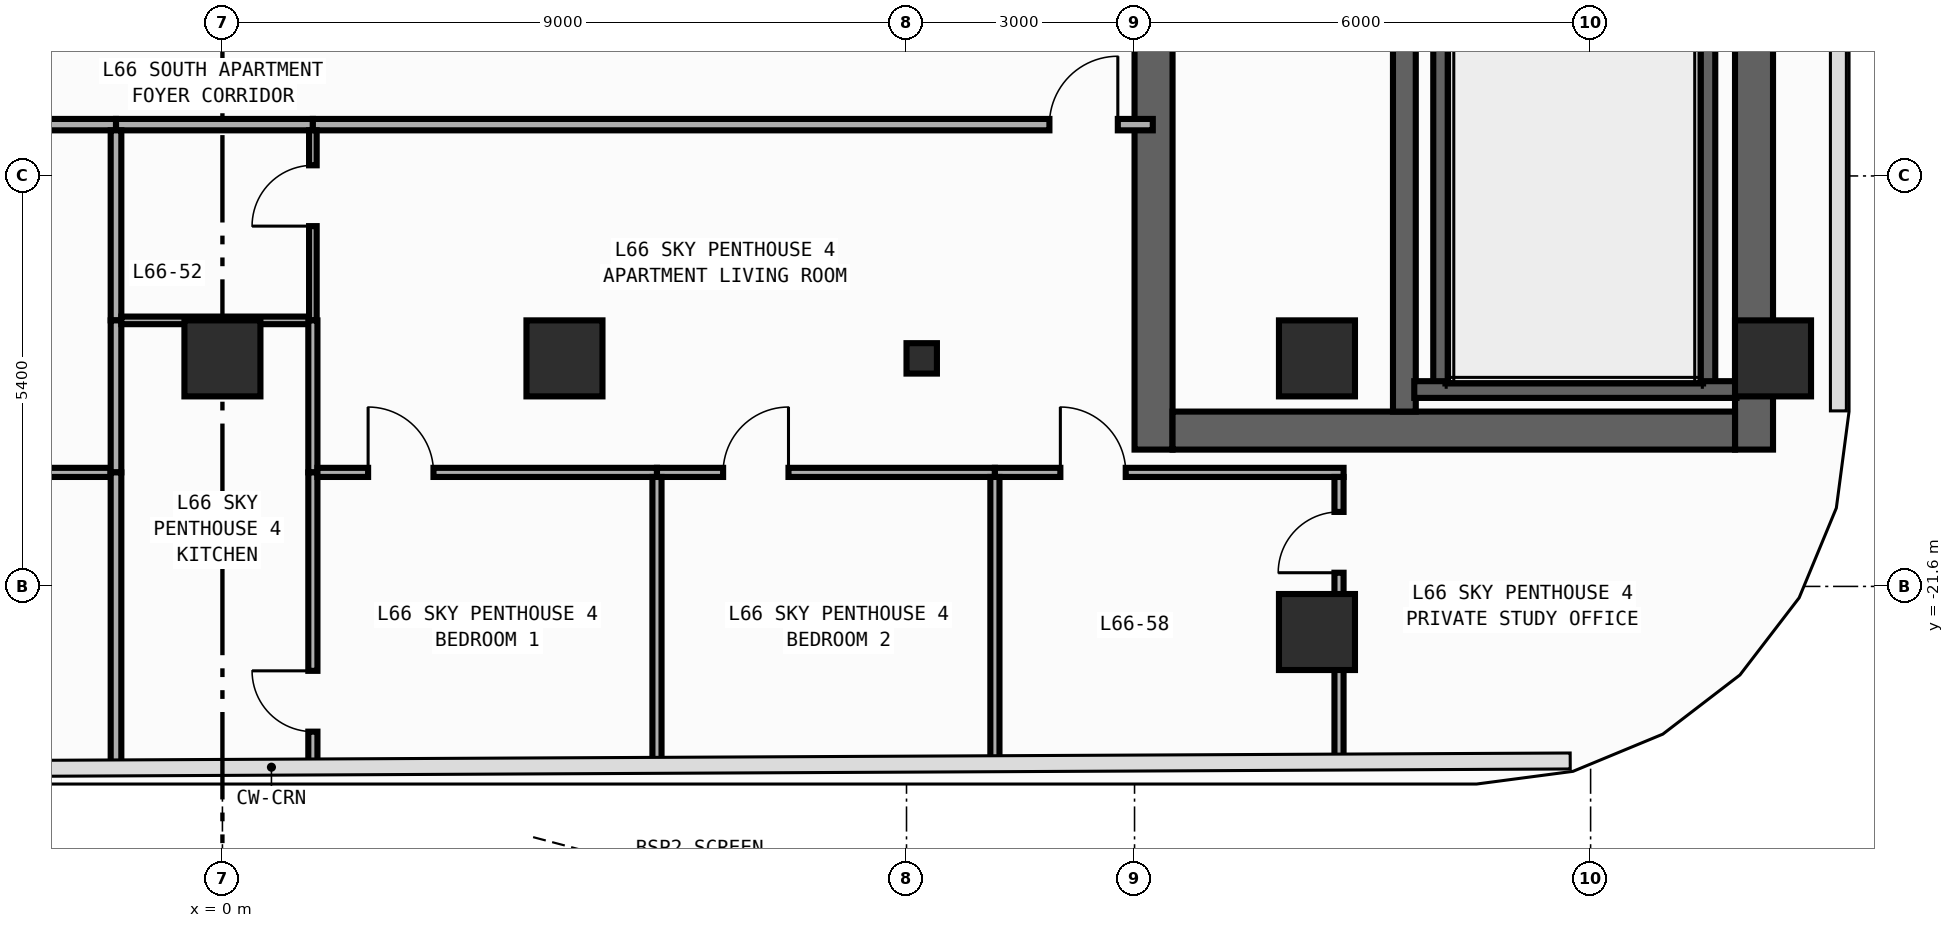
"""IFC4 building model, lengths in metres.
Left out: names, types, materials, properties, quantities, classifications, styles, units other than length and angle.
Written with IfcOpenShell. Run it as: python <this file> out.ifc"""

import sys

from ifc_helpers import new_model, si_unit, direction, frame, frame_2d, origin, origin_2d, place, context, subcontext, project, spatial, rectangle, circle, i_section, extrude, element, fill, save


model = new_model("IFC4")
c1 = context("Model", 3, precision=1e-05, world=origin(), true_north=direction((0.0, 1.0)))
c2 = subcontext(c1, "Body", "Model", "MODEL_VIEW")
j1 = project(units=[si_unit("LENGTHUNIT", "METRE"), si_unit("PLANEANGLEUNIT", "RADIAN")], contexts=[c1])
p1 = place(None, origin())
s1 = spatial("IfcSite", under=j1, at=p1, CompositionType="ELEMENT")
p2 = place(p1, origin())
s2 = spatial("IfcBuilding", under=s1, at=p2, CompositionType="ELEMENT")
p3 = place(p2, frame((0.0, 0.0, 277.6)))
s3 = spatial("IfcBuildingStorey", under=s2, at=p3, CompositionType="ELEMENT", Elevation=277.6)
p4 = place(p3, frame((12.25, -19.8, 0.0), z_axis=(0.0, 0.0, 1.0), x_axis=(0.0, 1.0, 0.0)))
e1 = element("IfcWall", 1, at=p4, inside=s3, PredefinedType="SHEAR", context=c2, shape_type="SweptSolid", body=[
    extrude(rectangle(XDim=27.0, YDim=0.5, at=frame_2d((13.5, 0.0))), origin(), (0.0, 0.0, 1.0), 3.54),
])
p5 = place(p4, frame((23.05, 0.0, 0.0)))
e2 = element("IfcOpeningElement", 2, at=p5, cuts=e1, PredefinedType="OPENING", context=c2, shape_type="SweptSolid", body=[
    extrude(rectangle(XDim=1.1, YDim=2.2, at=frame_2d((0.55, 1.1))), frame((0.0, 0.26, 0.0), z_axis=(0.0, -1.0, 0.0), x_axis=(1.0, 0.0, 0.0)), (0.0, 0.0, 1.0), 0.52),
])
p6 = place(p4, frame((19.85, 0.0, 0.0)))
e3 = element("IfcOpeningElement", 3, at=p6, cuts=e1, PredefinedType="OPENING", context=c2, shape_type="SweptSolid", body=[
    extrude(rectangle(XDim=1.1, YDim=2.2, at=frame_2d((0.55, 1.1))), frame((0.0, 0.26, 0.0), z_axis=(0.0, -1.0, 0.0), x_axis=(1.0, 0.0, 0.0)), (0.0, 0.0, 1.0), 0.52),
])
p7 = place(p4, frame((16.65, 0.0, 0.0)))
e4 = element("IfcOpeningElement", 4, at=p7, cuts=e1, PredefinedType="OPENING", context=c2, shape_type="SweptSolid", body=[
    extrude(rectangle(XDim=1.1, YDim=2.2, at=frame_2d((0.55, 1.1))), frame((0.0, 0.26, 0.0), z_axis=(0.0, -1.0, 0.0), x_axis=(1.0, 0.0, 0.0)), (0.0, 0.0, 1.0), 0.52),
])
p8 = place(p4, frame((6.275, 0.0, 0.0)))
e5 = element("IfcOpeningElement", 5, at=p8, cuts=e1, PredefinedType="OPENING", context=c2, shape_type="SweptSolid", body=[
    extrude(rectangle(XDim=0.85, YDim=2.1, at=frame_2d((0.425, 1.05))), frame((0.0, 0.26, 0.0), z_axis=(0.0, -1.0, 0.0), x_axis=(1.0, 0.0, 0.0)), (0.0, 0.0, 1.0), 0.52),
])
p9 = place(p4, frame((8.575, 0.0, 0.0)))
e6 = element("IfcOpeningElement", 6, at=p9, cuts=e1, PredefinedType="OPENING", context=c2, shape_type="SweptSolid", body=[
    extrude(rectangle(XDim=0.85, YDim=2.1, at=frame_2d((0.425, 1.05))), frame((0.0, 0.26, 0.0), z_axis=(0.0, -1.0, 0.0), x_axis=(1.0, 0.0, 0.0)), (0.0, 0.0, 1.0), 0.52),
])
p10 = place(p4, frame((10.675, 0.0, 0.0)))
e7 = element("IfcOpeningElement", 7, at=p10, cuts=e1, PredefinedType="OPENING", context=c2, shape_type="SweptSolid", body=[
    extrude(rectangle(XDim=0.85, YDim=2.1, at=frame_2d((0.425, 1.05))), frame((0.0, 0.26, 0.0), z_axis=(0.0, -1.0, 0.0), x_axis=(1.0, 0.0, 0.0)), (0.0, 0.0, 1.0), 0.52),
])
p11 = place(p4, frame((12.725, 0.0, 0.0)))
e8 = element("IfcOpeningElement", 8, at=p11, cuts=e1, PredefinedType="OPENING", context=c2, shape_type="SweptSolid", body=[
    extrude(rectangle(XDim=1.15, YDim=2.2, at=frame_2d((0.575, 1.1))), frame((0.0, 0.26, 0.0), z_axis=(0.0, -1.0, 0.0), x_axis=(1.0, 0.0, 0.0)), (0.0, 0.0, 1.0), 0.52),
])
p12 = place(p4, frame((25.125, 0.0, 0.0)))
e9 = element("IfcOpeningElement", 9, at=p12, cuts=e1, PredefinedType="OPENING", context=c2, shape_type="SweptSolid", body=[
    extrude(rectangle(XDim=0.85, YDim=2.1, at=frame_2d((0.425, 1.05))), frame((0.0, 0.26, 0.0), z_axis=(0.0, -1.0, 0.0), x_axis=(1.0, 0.0, 0.0)), (0.0, 0.0, 1.0), 0.52),
])
p13 = place(p3, frame((20.15, -19.8, 0.0), z_axis=(0.0, 0.0, 1.0), x_axis=(0.0, 1.0, 0.0)))
e10 = element("IfcWall", 10, at=p13, inside=s3, PredefinedType="SHEAR", context=c2, shape_type="SweptSolid", body=[
    extrude(rectangle(XDim=27.0, YDim=0.5, at=frame_2d((13.5, 0.0))), origin(), (0.0, 0.0, 1.0), 3.54),
])
p14 = place(p3, frame((12.5, -19.55, 0.0), z_axis=(0.0, 0.0, 1.0), x_axis=(1.0, 0.0, 0.0)))
e11 = element("IfcWall", 11, at=p14, inside=s3, PredefinedType="SHEAR", context=c2, shape_type="SweptSolid", body=[
    extrude(rectangle(XDim=7.4, YDim=0.5, at=frame_2d((3.7, 0.0))), origin(), (0.0, 0.0, 1.0), 3.54),
])
p15 = place(p3, frame((15.55, -19.3, 0.0), z_axis=(0.0, 0.0, 1.0), x_axis=(0.0, 1.0, 0.0)))
e12 = element("IfcWall", 12, at=p15, inside=s3, PredefinedType="SHEAR", context=c2, shape_type="SweptSolid", body=[
    extrude(rectangle(XDim=26.0, YDim=0.3, at=frame_2d((13.0, 0.0))), origin(), (0.0, 0.0, 1.0), 3.54),
])
p16 = place(p15, frame((12.225, 0.0, 0.0)))
e13 = element("IfcOpeningElement", 13, at=p16, cuts=e12, PredefinedType="OPENING", context=c2, shape_type="SweptSolid", body=[
    extrude(rectangle(XDim=1.15, YDim=2.2, at=frame_2d((0.575, 1.1))), frame((0.0, 0.16, 0.0), z_axis=(0.0, -1.0, 0.0), x_axis=(1.0, 0.0, 0.0)), (0.0, 0.0, 1.0), 0.32),
])
p17 = place(p15, frame((24.625, 0.0, 0.0)))
e14 = element("IfcOpeningElement", 14, at=p17, cuts=e12, PredefinedType="OPENING", context=c2, shape_type="SweptSolid", body=[
    extrude(rectangle(XDim=0.85, YDim=2.1, at=frame_2d((0.425, 1.05))), frame((0.0, 0.16, 0.0), z_axis=(0.0, -1.0, 0.0), x_axis=(1.0, 0.0, 0.0)), (0.0, 0.0, 1.0), 0.32),
])
for number, where, z_axis, x_axis in (
    (15, (16.04, -19.01, 0.0), (0.0, 0.0, 1.0), (0.0, 1.0, 0.0)),
    (16, (19.53, -19.01, 0.0), (0.0, 0.0, 1.0), (0.0, 1.0, 0.0)),
):
    element("IfcWall", number, at=place(p3, frame(where, z_axis=z_axis, x_axis=x_axis)), inside=s3, PredefinedType="SHEAR", context=c2, shape_type="SweptSolid", body=[
        extrude(rectangle(XDim=11.42, YDim=0.22, at=frame_2d((5.71, 0.0))), origin(), (0.0, 0.0, 1.0), 3.54),
    ])
p18 = place(p3, frame((15.68, -19.01, 0.0), z_axis=(0.0, 0.0, 1.0), x_axis=(1.0, 0.0, 0.0)))
e17 = element("IfcWall", 17, at=p18, inside=s3, PredefinedType="SHEAR", context=c2, shape_type="SweptSolid", body=[
    extrude(rectangle(XDim=4.24, YDim=0.22, at=frame_2d((2.12, 0.0))), origin(), (0.0, 0.0, 1.0), 3.54),
])
p19 = place(p3, frame((9.2, -18.6, 0.0), z_axis=(0.0, 0.0, 1.0), x_axis=(1.0, 0.0, 0.0)))
e18 = element("IfcColumn", 18, at=p19, inside=s3, PredefinedType="COLUMN", context=c2, shape_type="SweptSolid", body=[
    extrude(i_section(OverallWidth=0.4, OverallDepth=0.4, WebThickness=0.013, FlangeThickness=0.021, FilletRadius=0.022, at=origin_2d()), origin(), (0.0, 0.0, 1.0), 3.8),
])
for number, where, z_axis, x_axis in (
    (19, (20.4, -18.6, 0.0), (0.0, 0.0, 1.0), (1.0, 0.0, 0.0)),
    (20, (14.4, -18.6, 0.0), (0.0, 0.0, 1.0), (1.0, 0.0, 0.0)),
    (21, (0.0, -18.6, 0.0), (0.0, 0.0, 1.0), (1.0, 0.0, 0.0)),
    (22, (4.5, -18.6, 0.0), (0.0, 0.0, 1.0), (1.0, 0.0, 0.0)),
    (23, (14.4, -22.2, 0.0), (0.0, 0.0, 1.0), (1.0, 0.0, 0.0)),
):
    element("IfcColumn", number, at=place(p3, frame(where, z_axis=z_axis, x_axis=x_axis)), inside=s3, PredefinedType="COLUMN", context=c2, shape_type="SweptSolid", body=[
        extrude(circle(Radius=0.5, at=origin_2d()), origin(), (0.0, 0.0, 1.0), 3.8),
    ])
p20 = place(p3, frame((-15.11, -15.525, 0.0), z_axis=(0.0, 0.0, 1.0), x_axis=(1.0, 0.0, 0.0)))
e24 = element("IfcWall", 24, at=p20, inside=s3, PredefinedType="PARTITIONING", context=c2, shape_type="SweptSolid", body=[
    extrude(rectangle(XDim=13.71, YDim=0.15, at=frame_2d((6.855, 0.0))), origin(), (0.0, 0.0, 1.0), 3.54),
])
p21 = place(p20, frame((3.08, 0.0, 0.0)))
e25 = element("IfcOpeningElement", 25, at=p21, cuts=e24, PredefinedType="OPENING", context=c2, shape_type="SweptSolid", body=[
    extrude(rectangle(XDim=0.9, YDim=2.15, at=frame_2d((0.45, 1.075))), frame((0.0, 0.085, 0.0), z_axis=(0.0, -1.0, 0.0), x_axis=(1.0, 0.0, 0.0)), (0.0, 0.0, 1.0), 0.17),
])
p22 = place(p3, frame((-1.4, -15.525, 0.0), z_axis=(0.0, 0.0, 1.0), x_axis=(1.0, 0.0, 0.0)))
e26 = element("IfcWall", 26, at=p22, inside=s3, PredefinedType="PARTITIONING", context=c2, shape_type="SweptSolid", body=[
    extrude(rectangle(XDim=2.59, YDim=0.15, at=frame_2d((1.295, 0.0))), origin(), (0.0, 0.0, 1.0), 3.54),
])
p23 = place(p3, frame((1.19, -15.525, 0.0), z_axis=(0.0, 0.0, 1.0), x_axis=(1.0, 0.0, 0.0)))
e27 = element("IfcWall", 27, at=p23, inside=s3, PredefinedType="PARTITIONING", context=c2, shape_type="SweptSolid", body=[
    extrude(rectangle(XDim=11.05, YDim=0.15, at=frame_2d((5.525, 0.0))), origin(), (0.0, 0.0, 1.0), 3.54),
])
p24 = place(p23, frame((9.69, 0.0, 0.0)))
e28 = element("IfcOpeningElement", 28, at=p24, cuts=e27, PredefinedType="OPENING", context=c2, shape_type="SweptSolid", body=[
    extrude(rectangle(XDim=0.9, YDim=2.15, at=frame_2d((0.45, 1.075))), frame((0.0, 0.085, 0.0), z_axis=(0.0, -1.0, 0.0), x_axis=(1.0, 0.0, 0.0)), (0.0, 0.0, 1.0), 0.17),
])
p25 = place(p3, frame((-8.295, -20.1, 0.0), z_axis=(0.0, 0.0, 1.0), x_axis=(1.0, 0.0, 0.0)))
e29 = element("IfcWall", 29, at=p25, inside=s3, PredefinedType="PARTITIONING", context=c2, shape_type="SweptSolid", body=[
    extrude(rectangle(XDim=6.825, YDim=0.12, at=frame_2d((3.413, 0.0))), origin(), (0.0, 0.0, 1.0), 3.54),
])
p26 = place(p25, frame((0.864, 0.0, 0.0)))
e30 = element("IfcOpeningElement", 30, at=p26, cuts=e29, PredefinedType="OPENING", context=c2, shape_type="SweptSolid", body=[
    extrude(rectangle(XDim=0.86, YDim=2.15, at=frame_2d((0.43, 1.075))), frame((0.0, 0.07, 0.0), z_axis=(0.0, -1.0, 0.0), x_axis=(1.0, 0.0, 0.0)), (0.0, 0.0, 1.0), 0.14),
])
p27 = place(p3, frame((-1.4, -18.1, 0.0), z_axis=(0.0, 0.0, 1.0), x_axis=(0.0, 1.0, 0.0)))
e31 = element("IfcWall", 31, at=p27, inside=s3, PredefinedType="PARTITIONING", context=c2, shape_type="SweptSolid", body=[
    extrude(rectangle(XDim=2.5, YDim=0.14, at=frame_2d((1.25, 0.0))), origin(), (0.0, 0.0, 1.0), 3.54),
])
p28 = place(p3, frame((-1.4, -20.1, 0.0), z_axis=(0.0, 0.0, 1.0), x_axis=(0.0, 1.0, 0.0)))
e32 = element("IfcWall", 32, at=p28, inside=s3, PredefinedType="PARTITIONING", context=c2, shape_type="SweptSolid", body=[
    extrude(rectangle(XDim=2.0, YDim=0.14, at=frame_2d((1.0, 0.0))), origin(), (0.0, 0.0, 1.0), 3.54),
])
p29 = place(p3, frame((-1.4, -23.983, 0.0), z_axis=(0.0, 0.0, 1.0), x_axis=(0.0, 1.0, 0.0)))
e33 = element("IfcWall", 33, at=p29, inside=s3, PredefinedType="PARTITIONING", context=c2, shape_type="SweptSolid", body=[
    extrude(rectangle(XDim=3.883, YDim=0.14, at=frame_2d((1.941, 0.0))), origin(), (0.0, 0.0, 1.0), 3.54),
])
p30 = place(p3, frame((-1.33, -18.1, 0.0), z_axis=(0.0, 0.0, 1.0), x_axis=(1.0, 0.0, 0.0)))
e34 = element("IfcWall", 34, at=p30, inside=s3, PredefinedType="PARTITIONING", context=c2, shape_type="SweptSolid", body=[
    extrude(rectangle(XDim=2.47, YDim=0.1, at=frame_2d((1.235, 0.0))), origin(), (0.0, 0.0, 1.0), 3.54),
])
p31 = place(p3, frame((1.19, -18.1, 0.0), z_axis=(0.0, 0.0, 1.0), x_axis=(0.0, 1.0, 0.0)))
e35 = element("IfcWall", 35, at=p31, inside=s3, PredefinedType="PARTITIONING", context=c2, shape_type="SweptSolid", body=[
    extrude(rectangle(XDim=2.5, YDim=0.1, at=frame_2d((1.25, 0.0))), origin(), (0.0, 0.0, 1.0), 3.54),
])
p32 = place(p31, frame((1.24, 0.0, 0.0)))
e36 = element("IfcOpeningElement", 36, at=p32, cuts=e35, PredefinedType="OPENING", context=c2, shape_type="SweptSolid", body=[
    extrude(rectangle(XDim=0.8, YDim=2.1, at=frame_2d((0.4, 1.05))), frame((0.0, 0.06, 0.0), z_axis=(0.0, -1.0, 0.0), x_axis=(1.0, 0.0, 0.0)), (0.0, 0.0, 1.0), 0.12),
])
p33 = place(p3, frame((1.19, -20.1, 0.0), z_axis=(0.0, 0.0, 1.0), x_axis=(0.0, 1.0, 0.0)))
e37 = element("IfcWall", 37, at=p33, inside=s3, PredefinedType="PARTITIONING", context=c2, shape_type="SweptSolid", body=[
    extrude(rectangle(XDim=2.0, YDim=0.12, at=frame_2d((1.0, 0.0))), origin(), (0.0, 0.0, 1.0), 3.54),
])
p34 = place(p3, frame((1.19, -23.971, 0.0), z_axis=(0.0, 0.0, 1.0), x_axis=(0.0, 1.0, 0.0)))
e38 = element("IfcWall", 38, at=p34, inside=s3, PredefinedType="PARTITIONING", context=c2, shape_type="SweptSolid", body=[
    extrude(rectangle(XDim=3.871, YDim=0.12, at=frame_2d((1.935, 0.0))), origin(), (0.0, 0.0, 1.0), 3.54),
])
p35 = place(p34, frame((0.46, 0.0, 0.0)))
e39 = element("IfcOpeningElement", 39, at=p35, cuts=e38, PredefinedType="OPENING", context=c2, shape_type="SweptSolid", body=[
    extrude(rectangle(XDim=0.8, YDim=2.1, at=frame_2d((0.4, 1.05))), frame((0.0, 0.07, 0.0), z_axis=(0.0, -1.0, 0.0), x_axis=(1.0, 0.0, 0.0)), (0.0, 0.0, 1.0), 0.14),
])
p36 = place(p3, frame((1.25, -20.1, 0.0), z_axis=(0.0, 0.0, 1.0), x_axis=(1.0, 0.0, 0.0)))
e40 = element("IfcWall", 40, at=p36, inside=s3, PredefinedType="PARTITIONING", context=c2, shape_type="SweptSolid", body=[
    extrude(rectangle(XDim=4.467, YDim=0.12, at=frame_2d((2.233, 0.0))), origin(), (0.0, 0.0, 1.0), 3.54),
])
p37 = place(p36, frame((0.667, 0.0, 0.0)))
e41 = element("IfcOpeningElement", 41, at=p37, cuts=e40, PredefinedType="OPENING", context=c2, shape_type="SweptSolid", body=[
    extrude(rectangle(XDim=0.86, YDim=2.15, at=frame_2d((0.43, 1.075))), frame((0.0, 0.07, 0.0), z_axis=(0.0, -1.0, 0.0), x_axis=(1.0, 0.0, 0.0)), (0.0, 0.0, 1.0), 0.14),
])
p38 = place(p3, frame((5.717, -20.1, 0.0), z_axis=(0.0, 0.0, 1.0), x_axis=(1.0, 0.0, 0.0)))
e42 = element("IfcWall", 42, at=p38, inside=s3, PredefinedType="PARTITIONING", context=c2, shape_type="SweptSolid", body=[
    extrude(rectangle(XDim=4.446, YDim=0.12, at=frame_2d((2.223, 0.0))), origin(), (0.0, 0.0, 1.0), 3.54),
])
p39 = place(p38, frame((0.87, 0.0, 0.0)))
e43 = element("IfcOpeningElement", 43, at=p39, cuts=e42, PredefinedType="OPENING", context=c2, shape_type="SweptSolid", body=[
    extrude(rectangle(XDim=0.86, YDim=2.15, at=frame_2d((0.43, 1.075))), frame((0.0, 0.07, 0.0), z_axis=(0.0, -1.0, 0.0), x_axis=(1.0, 0.0, 0.0)), (0.0, 0.0, 1.0), 0.14),
])
p40 = place(p3, frame((10.163, -20.1, 0.0), z_axis=(0.0, 0.0, 1.0), x_axis=(1.0, 0.0, 0.0)))
e44 = element("IfcWall", 44, at=p40, inside=s3, PredefinedType="PARTITIONING", context=c2, shape_type="SweptSolid", body=[
    extrude(rectangle(XDim=4.587, YDim=0.12, at=frame_2d((2.293, 0.0))), origin(), (0.0, 0.0, 1.0), 3.54),
])
p41 = place(p40, frame((0.861, 0.0, 0.0)))
e45 = element("IfcOpeningElement", 45, at=p41, cuts=e44, PredefinedType="OPENING", context=c2, shape_type="SweptSolid", body=[
    extrude(rectangle(XDim=0.86, YDim=2.15, at=frame_2d((0.43, 1.075))), frame((0.0, 0.07, 0.0), z_axis=(0.0, -1.0, 0.0), x_axis=(1.0, 0.0, 0.0)), (0.0, 0.0, 1.0), 0.14),
])
p42 = place(p3, frame((14.69, -23.906, 0.0), z_axis=(0.0, 0.0, 1.0), x_axis=(0.0, 1.0, 0.0)))
e46 = element("IfcWall", 46, at=p42, inside=s3, PredefinedType="PARTITIONING", context=c2, shape_type="SweptSolid", body=[
    extrude(rectangle(XDim=3.746, YDim=0.12, at=frame_2d((1.873, 0.0))), origin(), (0.0, 0.0, 1.0), 2.64),
])
p43 = place(p42, frame((2.486, 0.0, 0.0)))
e47 = element("IfcOpeningElement", 47, at=p43, cuts=e46, PredefinedType="OPENING", context=c2, shape_type="SweptSolid", body=[
    extrude(rectangle(XDim=0.8, YDim=2.1, at=frame_2d((0.4, 1.05))), frame((0.0, 0.07, 0.0), z_axis=(0.0, -1.0, 0.0), x_axis=(1.0, 0.0, 0.0)), (0.0, 0.0, 1.0), 0.14),
])
p44 = place(p3, frame((5.717, -23.949, 0.0), z_axis=(0.0, 0.0, 1.0), x_axis=(0.0, 1.0, 0.0)))
e48 = element("IfcWall", 48, at=p44, inside=s3, PredefinedType="PARTITIONING", context=c2, shape_type="SweptSolid", body=[
    extrude(rectangle(XDim=3.789, YDim=0.12, at=frame_2d((1.895, 0.0))), origin(), (0.0, 0.0, 1.0), 3.54),
])
p45 = place(p3, frame((10.163, -23.928, 0.0), z_axis=(0.0, 0.0, 1.0), x_axis=(0.0, 1.0, 0.0)))
e49 = element("IfcWall", 49, at=p45, inside=s3, PredefinedType="PARTITIONING", context=c2, shape_type="SweptSolid", body=[
    extrude(rectangle(XDim=3.768, YDim=0.12, at=frame_2d((1.884, 0.0))), origin(), (0.0, 0.0, 1.0), 3.54),
])
p46 = place(p24, origin())
e50 = element("IfcDoor", 50, at=p46, inside=s3, OperationType="SINGLE_SWING_RIGHT", PredefinedType="DOOR", context=c2, shape_type="SweptSolid", body=[
    extrude(rectangle(XDim=0.9, YDim=2.15, at=frame_2d((0.45, 1.075))), frame((0.0, 0.025, 0.0), z_axis=(0.0, -1.0, 0.0), x_axis=(1.0, 0.0, 0.0)), (0.0, 0.0, 1.0), 0.05),
])
fill(e28, e50)
p47 = place(p32, origin())
e51 = element("IfcDoor", 51, at=p47, inside=s3, OperationType="SINGLE_SWING_LEFT", PredefinedType="DOOR", context=c2, shape_type="SweptSolid", body=[
    extrude(rectangle(XDim=0.8, YDim=2.1, at=frame_2d((0.4, 1.05))), frame((0.0, 0.025, 0.0), z_axis=(0.0, -1.0, 0.0), x_axis=(1.0, 0.0, 0.0)), (0.0, 0.0, 1.0), 0.05),
])
fill(e36, e51)
p48 = place(p37, origin())
e52 = element("IfcDoor", 52, at=p48, inside=s3, OperationType="SINGLE_SWING_LEFT", PredefinedType="DOOR", context=c2, shape_type="SweptSolid", body=[
    extrude(rectangle(XDim=0.86, YDim=2.15, at=frame_2d((0.43, 1.075))), frame((0.0, 0.025, 0.0), z_axis=(0.0, -1.0, 0.0), x_axis=(1.0, 0.0, 0.0)), (0.0, 0.0, 1.0), 0.05),
])
fill(e41, e52)
p49 = place(p39, origin())
e53 = element("IfcDoor", 53, at=p49, inside=s3, OperationType="SINGLE_SWING_RIGHT", PredefinedType="DOOR", context=c2, shape_type="SweptSolid", body=[
    extrude(rectangle(XDim=0.86, YDim=2.15, at=frame_2d((0.43, 1.075))), frame((0.0, 0.025, 0.0), z_axis=(0.0, -1.0, 0.0), x_axis=(1.0, 0.0, 0.0)), (0.0, 0.0, 1.0), 0.05),
])
fill(e43, e53)
p50 = place(p41, origin())
e54 = element("IfcDoor", 54, at=p50, inside=s3, OperationType="SINGLE_SWING_LEFT", PredefinedType="DOOR", context=c2, shape_type="SweptSolid", body=[
    extrude(rectangle(XDim=0.86, YDim=2.15, at=frame_2d((0.43, 1.075))), frame((0.0, 0.025, 0.0), z_axis=(0.0, -1.0, 0.0), x_axis=(1.0, 0.0, 0.0)), (0.0, 0.0, 1.0), 0.05),
])
fill(e45, e54)
p51 = place(p35, origin())
e55 = element("IfcDoor", 55, at=p51, inside=s3, OperationType="SINGLE_SWING_RIGHT", PredefinedType="DOOR", context=c2, shape_type="SweptSolid", body=[
    extrude(rectangle(XDim=0.8, YDim=2.1, at=frame_2d((0.4, 1.05))), frame((0.0, 0.025, 0.0), z_axis=(0.0, -1.0, 0.0), x_axis=(1.0, 0.0, 0.0)), (0.0, 0.0, 1.0), 0.05),
])
fill(e39, e55)
p52 = place(p43, origin())
e56 = element("IfcDoor", 56, at=p52, inside=s3, OperationType="SINGLE_SWING_LEFT", PredefinedType="DOOR", context=c2, shape_type="SweptSolid", body=[
    extrude(rectangle(XDim=0.8, YDim=2.1, at=frame_2d((0.4, 1.05))), frame((0.0, 0.025, 0.0), z_axis=(0.0, -1.0, 0.0), x_axis=(1.0, 0.0, 0.0)), (0.0, 0.0, 1.0), 0.05),
])
fill(e47, e56)
save(model, sys.argv[1])
